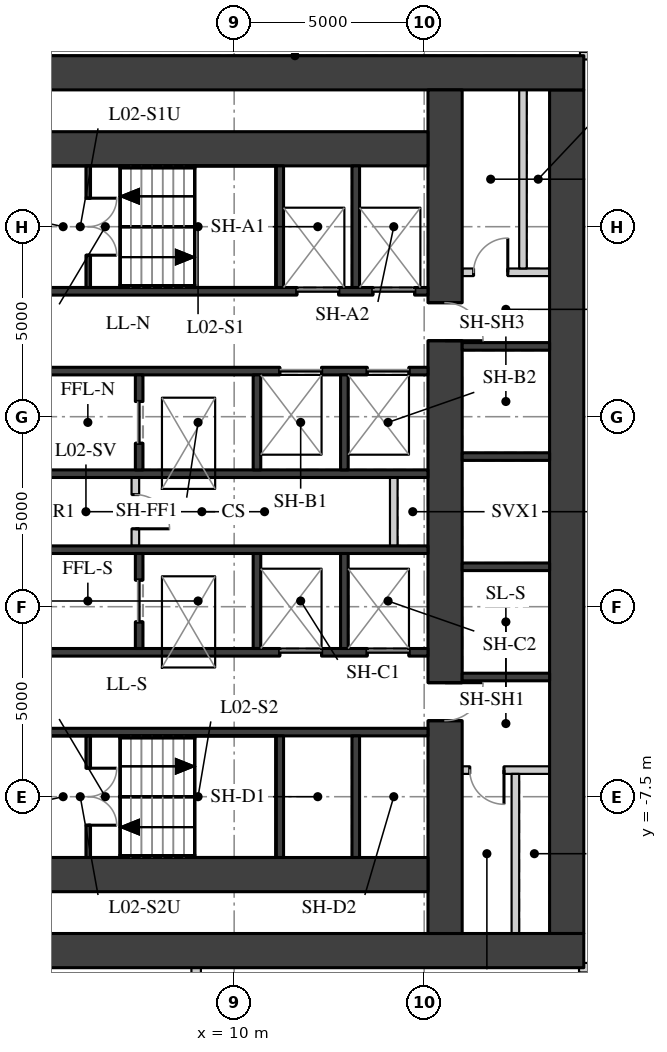
"""IFC4 building model, lengths in metres.
Left out: names, types, materials, properties, quantities, classifications, styles, units other than length and angle.
Written with IfcOpenShell. Run it as: python <this file> out.ifc"""

import sys

from ifc_helpers import new_model, si_unit, direction, frame, frame_2d, origin, place, context, subcontext, project, spatial, rectangle, extrude, element, fill, save


model = new_model("IFC4")
c1 = context("Model", 3, precision=1e-05, world=origin(), true_north=direction((0.0, 1.0)))
c2 = subcontext(c1, "Body", "Model", "MODEL_VIEW")
j1 = project(units=[si_unit("LENGTHUNIT", "METRE"), si_unit("PLANEANGLEUNIT", "RADIAN")], contexts=[c1])
p1 = place(None, origin())
s1 = spatial("IfcSite", under=j1, at=p1, CompositionType="ELEMENT")
p2 = place(p1, origin())
s2 = spatial("IfcBuilding", under=s1, at=p2, CompositionType="ELEMENT")
p3 = place(p2, frame((0.0, 0.0, 12.5)))
s3 = spatial("IfcBuildingStorey", under=s2, at=p3, CompositionType="ELEMENT", Elevation=12.5)
p4 = place(p3, frame((18.75, -11.1, 0.0), z_axis=(0.0, 0.0, 1.0), x_axis=(0.0, 1.0, 0.0)))
e1 = element("IfcWall", 1, at=p4, inside=s3, PredefinedType="SHEAR", context=c2, shape_type="SweptSolid", body=[
    extrude(rectangle(XDim=22.2, YDim=0.9, at=frame_2d((11.1, 0.0))), origin(), (0.0, 0.0, 1.0), 4.65),
])
for number, where, z_axis, x_axis in (
    (2, (4.0, 11.55, 0.0), (0.0, 0.0, 1.0), (1.0, 0.0, 0.0)),
    (3, (4.0, -11.55, 0.0), (0.0, 0.0, 1.0), (1.0, 0.0, 0.0)),
):
    element("IfcWall", number, at=place(p3, frame(where, z_axis=z_axis, x_axis=x_axis)), inside=s3, PredefinedType="SHEAR", context=c2, shape_type="SweptSolid", body=[
        extrude(rectangle(XDim=15.2, YDim=0.9, at=frame_2d((7.6, 0.0))), origin(), (0.0, 0.0, 1.0), 4.65),
    ])
p5 = place(p3, frame((15.55, -11.1, 0.0), z_axis=(0.0, 0.0, 1.0), x_axis=(0.0, 1.0, 0.0)))
e4 = element("IfcWall", 4, at=p5, inside=s3, PredefinedType="SHEAR", context=c2, shape_type="SweptSolid", body=[
    extrude(rectangle(XDim=22.2, YDim=0.9, at=frame_2d((11.1, 0.0))), origin(), (0.0, 0.0, 1.0), 4.65),
])
p6 = place(p5, frame((15.6, 0.0, 0.0)))
e5 = element("IfcOpeningElement", 5, at=p6, cuts=e4, PredefinedType="OPENING", context=c2, shape_type="SweptSolid", body=[
    extrude(rectangle(XDim=1.0, YDim=2.1, at=frame_2d((0.5, 1.05))), frame((0.0, 0.46, 0.0), z_axis=(0.0, -1.0, 0.0), x_axis=(1.0, 0.0, 0.0)), (0.0, 0.0, 1.0), 0.92),
])
p7 = place(p5, frame((5.6, 0.0, 0.0)))
e6 = element("IfcOpeningElement", 6, at=p7, cuts=e4, PredefinedType="OPENING", context=c2, shape_type="SweptSolid", body=[
    extrude(rectangle(XDim=1.0, YDim=2.1, at=frame_2d((0.5, 1.05))), frame((0.0, 0.46, 0.0), z_axis=(0.0, -1.0, 0.0), x_axis=(1.0, 0.0, 0.0)), (0.0, 0.0, 1.0), 0.92),
])
for number, where, z_axis, x_axis in (
    (7, (4.9, 9.55, 0.0), (0.0, 0.0, 1.0), (1.0, 0.0, 0.0)),
    (8, (4.9, -9.55, 0.0), (0.0, 0.0, 1.0), (1.0, 0.0, 0.0)),
):
    element("IfcWall", number, at=place(p3, frame(where, z_axis=z_axis, x_axis=x_axis)), inside=s3, PredefinedType="SHEAR", context=c2, shape_type="SweptSolid", body=[
        extrude(rectangle(XDim=10.2, YDim=0.9, at=frame_2d((5.1, 0.0))), origin(), (0.0, 0.0, 1.0), 4.65),
    ])
p8 = place(p3, frame((4.9, 5.8, 0.0), z_axis=(0.0, 0.0, 1.0), x_axis=(1.0, 0.0, 0.0)))
e9 = element("IfcWall", 9, at=p8, inside=s3, PredefinedType="SHEAR", context=c2, shape_type="SweptSolid", body=[
    extrude(rectangle(XDim=10.2, YDim=0.2, at=frame_2d((5.1, 0.0))), origin(), (0.0, 0.0, 1.0), 4.65),
])
p9 = place(p8, frame((6.75, 0.0, 0.0)))
e10 = element("IfcOpeningElement", 10, at=p9, cuts=e9, PredefinedType="OPENING", context=c2, shape_type="SweptSolid", body=[
    extrude(rectangle(XDim=1.1, YDim=2.1, at=frame_2d((0.55, 1.05))), frame((0.0, 0.11, 0.0), z_axis=(0.0, -1.0, 0.0), x_axis=(1.0, 0.0, 0.0)), (0.0, 0.0, 1.0), 0.22),
])
p10 = place(p8, frame((8.75, 0.0, 0.0)))
e11 = element("IfcOpeningElement", 11, at=p10, cuts=e9, PredefinedType="OPENING", context=c2, shape_type="SweptSolid", body=[
    extrude(rectangle(XDim=1.1, YDim=2.1, at=frame_2d((0.55, 1.05))), frame((0.0, 0.11, 0.0), z_axis=(0.0, -1.0, 0.0), x_axis=(1.0, 0.0, 0.0)), (0.0, 0.0, 1.0), 0.22),
])
p11 = place(p3, frame((4.9, 3.7, 0.0), z_axis=(0.0, 0.0, 1.0), x_axis=(1.0, 0.0, 0.0)))
e12 = element("IfcWall", 12, at=p11, inside=s3, PredefinedType="SHEAR", context=c2, shape_type="SweptSolid", body=[
    extrude(rectangle(XDim=10.2, YDim=0.2, at=frame_2d((5.1, 0.0))), origin(), (0.0, 0.0, 1.0), 4.65),
])
p12 = place(p11, frame((6.3, 0.0, 0.0)))
e13 = element("IfcOpeningElement", 13, at=p12, cuts=e12, PredefinedType="OPENING", context=c2, shape_type="SweptSolid", body=[
    extrude(rectangle(XDim=1.1, YDim=2.1, at=frame_2d((0.55, 1.05))), frame((0.0, 0.11, 0.0), z_axis=(0.0, -1.0, 0.0), x_axis=(1.0, 0.0, 0.0)), (0.0, 0.0, 1.0), 0.22),
])
p13 = place(p11, frame((8.6, 0.0, 0.0)))
e14 = element("IfcOpeningElement", 14, at=p13, cuts=e12, PredefinedType="OPENING", context=c2, shape_type="SweptSolid", body=[
    extrude(rectangle(XDim=1.1, YDim=2.1, at=frame_2d((0.55, 1.05))), frame((0.0, 0.11, 0.0), z_axis=(0.0, -1.0, 0.0), x_axis=(1.0, 0.0, 0.0)), (0.0, 0.0, 1.0), 0.22),
])
for number, where, z_axis, x_axis in (
    (15, (4.9, 1.0, 0.0), (0.0, 0.0, 1.0), (1.0, 0.0, 0.0)),
    (16, (4.9, -1.0, 0.0), (0.0, 0.0, 1.0), (1.0, 0.0, 0.0)),
):
    element("IfcWall", number, at=place(p3, frame(where, z_axis=z_axis, x_axis=x_axis)), inside=s3, PredefinedType="SHEAR", context=c2, shape_type="SweptSolid", body=[
        extrude(rectangle(XDim=10.2, YDim=0.2, at=frame_2d((5.1, 0.0))), origin(), (0.0, 0.0, 1.0), 4.65),
    ])
p14 = place(p3, frame((4.9, -3.7, 0.0), z_axis=(0.0, 0.0, 1.0), x_axis=(1.0, 0.0, 0.0)))
e17 = element("IfcWall", 17, at=p14, inside=s3, PredefinedType="SHEAR", context=c2, shape_type="SweptSolid", body=[
    extrude(rectangle(XDim=10.2, YDim=0.2, at=frame_2d((5.1, 0.0))), origin(), (0.0, 0.0, 1.0), 4.65),
])
p15 = place(p14, frame((6.3, 0.0, 0.0)))
e18 = element("IfcOpeningElement", 18, at=p15, cuts=e17, PredefinedType="OPENING", context=c2, shape_type="SweptSolid", body=[
    extrude(rectangle(XDim=1.1, YDim=2.1, at=frame_2d((0.55, 1.05))), frame((0.0, 0.11, 0.0), z_axis=(0.0, -1.0, 0.0), x_axis=(1.0, 0.0, 0.0)), (0.0, 0.0, 1.0), 0.22),
])
p16 = place(p14, frame((8.6, 0.0, 0.0)))
e19 = element("IfcOpeningElement", 19, at=p16, cuts=e17, PredefinedType="OPENING", context=c2, shape_type="SweptSolid", body=[
    extrude(rectangle(XDim=1.1, YDim=2.1, at=frame_2d((0.55, 1.05))), frame((0.0, 0.11, 0.0), z_axis=(0.0, -1.0, 0.0), x_axis=(1.0, 0.0, 0.0)), (0.0, 0.0, 1.0), 0.22),
])
p17 = place(p3, frame((4.9, -5.8, 0.0), z_axis=(0.0, 0.0, 1.0), x_axis=(1.0, 0.0, 0.0)))
e20 = element("IfcWall", 20, at=p17, inside=s3, PredefinedType="SHEAR", context=c2, shape_type="SweptSolid", body=[
    extrude(rectangle(XDim=10.2, YDim=0.2, at=frame_2d((5.1, 0.0))), origin(), (0.0, 0.0, 1.0), 4.65),
])
for number, where, z_axis, x_axis in (
    (21, (11.2, 5.9, 0.0), (0.0, 0.0, 1.0), (0.0, 1.0, 0.0)),
    (22, (11.2, -9.1, 0.0), (0.0, 0.0, 1.0), (0.0, 1.0, 0.0)),
    (23, (13.2, 5.9, 0.0), (0.0, 0.0, 1.0), (0.0, 1.0, 0.0)),
    (24, (13.2, -9.1, 0.0), (0.0, 0.0, 1.0), (0.0, 1.0, 0.0)),
):
    element("IfcWall", number, at=place(p3, frame(where, z_axis=z_axis, x_axis=x_axis)), inside=s3, PredefinedType="SHEAR", context=c2, shape_type="SweptSolid", body=[
        extrude(rectangle(XDim=3.2, YDim=0.2, at=frame_2d((1.6, 0.0))), origin(), (0.0, 0.0, 1.0), 4.65),
    ])
p18 = place(p3, frame((7.5, 1.1, 0.0), z_axis=(0.0, 0.0, 1.0), x_axis=(0.0, 1.0, 0.0)))
e25 = element("IfcWall", 25, at=p18, inside=s3, PredefinedType="SHEAR", context=c2, shape_type="SweptSolid", body=[
    extrude(rectangle(XDim=2.5, YDim=0.2, at=frame_2d((1.25, 0.0))), origin(), (0.0, 0.0, 1.0), 4.65),
])
p19 = place(p18, frame((0.7, 0.0, 0.0)))
e26 = element("IfcOpeningElement", 26, at=p19, cuts=e25, PredefinedType="OPENING", context=c2, shape_type="SweptSolid", body=[
    extrude(rectangle(XDim=1.1, YDim=2.1, at=frame_2d((0.55, 1.05))), frame((0.0, 0.11, 0.0), z_axis=(0.0, -1.0, 0.0), x_axis=(1.0, 0.0, 0.0)), (0.0, 0.0, 1.0), 0.22),
])
p20 = place(p3, frame((7.5, -3.6, 0.0), z_axis=(0.0, 0.0, 1.0), x_axis=(0.0, 1.0, 0.0)))
e27 = element("IfcWall", 27, at=p20, inside=s3, PredefinedType="SHEAR", context=c2, shape_type="SweptSolid", body=[
    extrude(rectangle(XDim=2.5, YDim=0.2, at=frame_2d((1.25, 0.0))), origin(), (0.0, 0.0, 1.0), 4.65),
])
p21 = place(p20, frame((0.7, 0.0, 0.0)))
e28 = element("IfcOpeningElement", 28, at=p21, cuts=e27, PredefinedType="OPENING", context=c2, shape_type="SweptSolid", body=[
    extrude(rectangle(XDim=1.1, YDim=2.1, at=frame_2d((0.55, 1.05))), frame((0.0, 0.11, 0.0), z_axis=(0.0, -1.0, 0.0), x_axis=(1.0, 0.0, 0.0)), (0.0, 0.0, 1.0), 0.22),
])
for number, where, z_axis, x_axis in (
    (29, (10.6, 1.1, 0.0), (0.0, 0.0, 1.0), (0.0, 1.0, 0.0)),
    (30, (10.6, -3.6, 0.0), (0.0, 0.0, 1.0), (0.0, 1.0, 0.0)),
    (31, (12.9, 1.1, 0.0), (0.0, 0.0, 1.0), (0.0, 1.0, 0.0)),
    (32, (12.9, -3.6, 0.0), (0.0, 0.0, 1.0), (0.0, 1.0, 0.0)),
):
    element("IfcWall", number, at=place(p3, frame(where, z_axis=z_axis, x_axis=x_axis)), inside=s3, PredefinedType="SHEAR", context=c2, shape_type="SweptSolid", body=[
        extrude(rectangle(XDim=2.5, YDim=0.2, at=frame_2d((1.25, 0.0))), origin(), (0.0, 0.0, 1.0), 4.65),
    ])
p22 = place(p3, frame((6.16, 5.9, 0.0), z_axis=(0.0, 0.0, 1.0), x_axis=(0.0, 1.0, 0.0)))
e33 = element("IfcWall", 33, at=p22, inside=s3, PredefinedType="SHEAR", context=c2, shape_type="SweptSolid", body=[
    extrude(rectangle(XDim=3.2, YDim=0.12, at=frame_2d((1.6, 0.0))), origin(), (0.0, 0.0, 1.0), 2.29),
])
p23 = place(p22, frame((0.85, 0.0, 0.0)))
e34 = element("IfcOpeningElement", 34, at=p23, cuts=e33, PredefinedType="OPENING", context=c2, shape_type="SweptSolid", body=[
    extrude(rectangle(XDim=1.5, YDim=2.1, at=frame_2d((0.75, 1.05))), frame((0.0, 0.07, 0.0), z_axis=(0.0, -1.0, 0.0), x_axis=(1.0, 0.0, 0.0)), (0.0, 0.0, 1.0), 0.14),
])
p24 = place(p3, frame((6.16, -9.1, 0.0), z_axis=(0.0, 0.0, 1.0), x_axis=(0.0, 1.0, 0.0)))
e35 = element("IfcWall", 35, at=p24, inside=s3, PredefinedType="SHEAR", context=c2, shape_type="SweptSolid", body=[
    extrude(rectangle(XDim=3.2, YDim=0.12, at=frame_2d((1.6, 0.0))), origin(), (0.0, 0.0, 1.0), 2.29),
])
p25 = place(p24, frame((0.85, 0.0, 0.0)))
e36 = element("IfcOpeningElement", 36, at=p25, cuts=e35, PredefinedType="OPENING", context=c2, shape_type="SweptSolid", body=[
    extrude(rectangle(XDim=1.5, YDim=2.1, at=frame_2d((0.75, 1.05))), frame((0.0, 0.07, 0.0), z_axis=(0.0, -1.0, 0.0), x_axis=(1.0, 0.0, 0.0)), (0.0, 0.0, 1.0), 0.14),
])
p26 = place(p3, frame((7.4, -0.9, 0.0), z_axis=(0.0, 0.0, 1.0), x_axis=(0.0, 1.0, 0.0)))
e37 = element("IfcWall", 37, at=p26, inside=s3, PredefinedType="PARTITIONING", context=c2, shape_type="SweptSolid", body=[
    extrude(rectangle(XDim=1.8, YDim=0.2, at=frame_2d((0.9, 0.0))), origin(), (0.0, 0.0, 1.0), 4.65),
])
p27 = place(p26, frame((0.45, 0.0, 0.0)))
e38 = element("IfcOpeningElement", 38, at=p27, cuts=e37, PredefinedType="OPENING", context=c2, shape_type="SweptSolid", body=[
    extrude(rectangle(XDim=0.9, YDim=2.1, at=frame_2d((0.45, 1.05))), frame((0.0, 0.11, 0.0), z_axis=(0.0, -1.0, 0.0), x_axis=(1.0, 0.0, 0.0)), (0.0, 0.0, 1.0), 0.22),
])
p28 = place(p3, frame((14.2, -0.9, 0.0), z_axis=(0.0, 0.0, 1.0), x_axis=(0.0, 1.0, 0.0)))
e39 = element("IfcWall", 39, at=p28, inside=s3, PredefinedType="PARTITIONING", context=c2, shape_type="SweptSolid", body=[
    extrude(rectangle(XDim=1.8, YDim=0.2, at=frame_2d((0.9, 0.0))), origin(), (0.0, 0.0, 1.0), 4.65),
])
for number, where, z_axis, x_axis in (
    (40, (16.0, -4.35, 0.0), (0.0, 0.0, 1.0), (1.0, 0.0, 0.0)),
    (41, (16.0, -1.45, 0.0), (0.0, 0.0, 1.0), (1.0, 0.0, 0.0)),
    (42, (16.0, 1.45, 0.0), (0.0, 0.0, 1.0), (1.0, 0.0, 0.0)),
    (43, (16.0, 4.35, 0.0), (0.0, 0.0, 1.0), (1.0, 0.0, 0.0)),
):
    element("IfcWall", number, at=place(p3, frame(where, z_axis=z_axis, x_axis=x_axis)), inside=s3, PredefinedType="SHEAR", context=c2, shape_type="SweptSolid", body=[
        extrude(rectangle(XDim=2.3, YDim=0.2, at=frame_2d((1.15, 0.0))), origin(), (0.0, 0.0, 1.0), 4.65),
    ])
p29 = place(p3, frame((16.0, 6.3, 0.0), z_axis=(0.0, 0.0, 1.0), x_axis=(1.0, 0.0, 0.0)))
e44 = element("IfcWall", 44, at=p29, inside=s3, PredefinedType="PARTITIONING", context=c2, shape_type="SweptSolid", body=[
    extrude(rectangle(XDim=2.3, YDim=0.2, at=frame_2d((1.15, 0.0))), origin(), (0.0, 0.0, 1.0), 4.65),
])
p30 = place(p29, frame((0.3, 0.0, 0.0)))
e45 = element("IfcOpeningElement", 45, at=p30, cuts=e44, PredefinedType="OPENING", context=c2, shape_type="SweptSolid", body=[
    extrude(rectangle(XDim=0.9, YDim=2.1, at=frame_2d((0.45, 1.05))), frame((0.0, 0.11, 0.0), z_axis=(0.0, -1.0, 0.0), x_axis=(1.0, 0.0, 0.0)), (0.0, 0.0, 1.0), 0.22),
])
p31 = place(p3, frame((17.6, 6.4, 0.0), z_axis=(0.0, 0.0, 1.0), x_axis=(0.0, 1.0, 0.0)))
e46 = element("IfcWall", 46, at=p31, inside=s3, PredefinedType="PARTITIONING", context=c2, shape_type="SweptSolid", body=[
    extrude(rectangle(XDim=4.7, YDim=0.2, at=frame_2d((2.35, 0.0))), origin(), (0.0, 0.0, 1.0), 4.65),
])
p32 = place(p3, frame((16.0, -6.8, 0.0), z_axis=(0.0, 0.0, 1.0), x_axis=(1.0, 0.0, 0.0)))
e47 = element("IfcWall", 47, at=p32, inside=s3, PredefinedType="PARTITIONING", context=c2, shape_type="SweptSolid", body=[
    extrude(rectangle(XDim=2.3, YDim=0.2, at=frame_2d((1.15, 0.0))), origin(), (0.0, 0.0, 1.0), 4.65),
])
p33 = place(p32, frame((0.2, 0.0, 0.0)))
e48 = element("IfcOpeningElement", 48, at=p33, cuts=e47, PredefinedType="OPENING", context=c2, shape_type="SweptSolid", body=[
    extrude(rectangle(XDim=0.9, YDim=2.1, at=frame_2d((0.45, 1.05))), frame((0.0, 0.11, 0.0), z_axis=(0.0, -1.0, 0.0), x_axis=(1.0, 0.0, 0.0)), (0.0, 0.0, 1.0), 0.22),
])
p34 = place(p3, frame((17.4, -11.1, 0.0), z_axis=(0.0, 0.0, 1.0), x_axis=(0.0, 1.0, 0.0)))
e49 = element("IfcWall", 49, at=p34, inside=s3, PredefinedType="PARTITIONING", context=c2, shape_type="SweptSolid", body=[
    extrude(rectangle(XDim=4.2, YDim=0.2, at=frame_2d((2.1, 0.0))), origin(), (0.0, 0.0, 1.0), 4.65),
])
p35 = place(p3, frame((19.075, -12.0, 0.0), z_axis=(0.0, 0.0, 1.0), x_axis=(1.0, 0.0, 0.0)))
e50 = element("IfcWall", 50, at=p35, inside=s3, PredefinedType="PARTITIONING", context=c2, shape_type="SweptSolid", body=[
    extrude(rectangle(XDim=21.806, YDim=0.25, at=frame_2d((10.903, 0.0))), origin(), (0.0, 0.0, 1.0), 3.75),
])
p36 = place(p35, frame((4.425, 0.0, 0.0)))
e51 = element("IfcOpeningElement", 51, at=p36, cuts=e50, PredefinedType="OPENING", context=c2, shape_type="SweptSolid", body=[
    extrude(rectangle(XDim=1.0, YDim=2.1, at=frame_2d((0.5, 1.05))), frame((0.0, 0.135, 0.0), z_axis=(0.0, -1.0, 0.0), x_axis=(1.0, 0.0, 0.0)), (0.0, 0.0, 1.0), 0.27),
])
p37 = place(p3, frame((19.1, 12.0, 0.0), z_axis=(0.0, 0.0, 1.0), x_axis=(1.0, 0.0, 0.0)))
e52 = element("IfcWall", 52, at=p37, inside=s3, PredefinedType="PARTITIONING", context=c2, shape_type="SweptSolid", body=[
    extrude(rectangle(XDim=21.767, YDim=0.2, at=frame_2d((10.883, 0.0))), origin(), (0.0, 0.0, 1.0), 3.65),
])
p38 = place(p37, frame((4.4, 0.0, 0.0)))
e53 = element("IfcOpeningElement", 53, at=p38, cuts=e52, PredefinedType="OPENING", context=c2, shape_type="SweptSolid", body=[
    extrude(rectangle(XDim=1.0, YDim=2.1, at=frame_2d((0.5, 1.05))), frame((0.0, 0.11, 0.0), z_axis=(0.0, -1.0, 0.0), x_axis=(1.0, 0.0, 0.0)), (0.0, 0.0, 1.0), 0.22),
])
p39 = place(p3, frame((9.0, -32.97, 0.0), z_axis=(0.0, 0.0, 1.0), x_axis=(0.0, 1.0, 0.0)))
e54 = element("IfcWall", 54, at=p39, inside=s3, PredefinedType="PARTITIONING", context=c2, shape_type="SweptSolid", body=[
    extrude(rectangle(XDim=20.972, YDim=0.25, at=frame_2d((10.486, 0.0))), origin(), (0.0, 0.0, 1.0), 4.1),
])
p40 = place(p39, frame((12.534, 0.0, 0.0)))
e55 = element("IfcOpeningElement", 55, at=p40, cuts=e54, PredefinedType="OPENING", context=c2, shape_type="SweptSolid", body=[
    extrude(rectangle(XDim=1.0, YDim=2.1, at=frame_2d((0.5, 1.05))), frame((0.0, 0.135, 0.0), z_axis=(0.0, -1.0, 0.0), x_axis=(1.0, 0.0, 0.0)), (0.0, 0.0, 1.0), 0.27),
])
p41 = place(p23, origin())
e56 = element("IfcDoor", 56, at=p41, inside=s3, OperationType="DOUBLE_DOOR_SINGLE_SWING", PredefinedType="DOOR", context=c2, shape_type="SweptSolid", body=[
    extrude(rectangle(XDim=1.5, YDim=2.1, at=frame_2d((0.75, 1.05))), frame((0.0, 0.025, 0.0), z_axis=(0.0, -1.0, 0.0), x_axis=(1.0, 0.0, 0.0)), (0.0, 0.0, 1.0), 0.05),
])
fill(e34, e56)
p42 = place(p25, origin())
e57 = element("IfcDoor", 57, at=p42, inside=s3, OperationType="DOUBLE_DOOR_SINGLE_SWING", PredefinedType="DOOR", context=c2, shape_type="SweptSolid", body=[
    extrude(rectangle(XDim=1.5, YDim=2.1, at=frame_2d((0.75, 1.05))), frame((0.0, 0.025, 0.0), z_axis=(0.0, -1.0, 0.0), x_axis=(1.0, 0.0, 0.0)), (0.0, 0.0, 1.0), 0.05),
])
fill(e36, e57)
p43 = place(p9, origin())
e58 = element("IfcDoor", 58, at=p43, inside=s3, OperationType="DOUBLE_DOOR_SLIDING", PredefinedType="DOOR", context=c2, shape_type="SweptSolid", body=[
    extrude(rectangle(XDim=1.1, YDim=2.1, at=frame_2d((0.55, 1.05))), frame((0.0, 0.025, 0.0), z_axis=(0.0, -1.0, 0.0), x_axis=(1.0, 0.0, 0.0)), (0.0, 0.0, 1.0), 0.05),
])
fill(e10, e58)
p44 = place(p10, origin())
e59 = element("IfcDoor", 59, at=p44, inside=s3, OperationType="DOUBLE_DOOR_SLIDING", PredefinedType="DOOR", context=c2, shape_type="SweptSolid", body=[
    extrude(rectangle(XDim=1.1, YDim=2.1, at=frame_2d((0.55, 1.05))), frame((0.0, 0.025, 0.0), z_axis=(0.0, -1.0, 0.0), x_axis=(1.0, 0.0, 0.0)), (0.0, 0.0, 1.0), 0.05),
])
fill(e11, e59)
p45 = place(p12, origin())
e60 = element("IfcDoor", 60, at=p45, inside=s3, OperationType="DOUBLE_DOOR_SLIDING", PredefinedType="DOOR", context=c2, shape_type="SweptSolid", body=[
    extrude(rectangle(XDim=1.1, YDim=2.1, at=frame_2d((0.55, 1.05))), frame((0.0, 0.025, 0.0), z_axis=(0.0, -1.0, 0.0), x_axis=(1.0, 0.0, 0.0)), (0.0, 0.0, 1.0), 0.05),
])
fill(e13, e60)
p46 = place(p13, origin())
e61 = element("IfcDoor", 61, at=p46, inside=s3, OperationType="DOUBLE_DOOR_SLIDING", PredefinedType="DOOR", context=c2, shape_type="SweptSolid", body=[
    extrude(rectangle(XDim=1.1, YDim=2.1, at=frame_2d((0.55, 1.05))), frame((0.0, 0.025, 0.0), z_axis=(0.0, -1.0, 0.0), x_axis=(1.0, 0.0, 0.0)), (0.0, 0.0, 1.0), 0.05),
])
fill(e14, e61)
p47 = place(p15, origin())
e62 = element("IfcDoor", 62, at=p47, inside=s3, OperationType="DOUBLE_DOOR_SLIDING", PredefinedType="DOOR", context=c2, shape_type="SweptSolid", body=[
    extrude(rectangle(XDim=1.1, YDim=2.1, at=frame_2d((0.55, 1.05))), frame((0.0, 0.025, 0.0), z_axis=(0.0, -1.0, 0.0), x_axis=(1.0, 0.0, 0.0)), (0.0, 0.0, 1.0), 0.05),
])
fill(e18, e62)
p48 = place(p16, origin())
e63 = element("IfcDoor", 63, at=p48, inside=s3, OperationType="DOUBLE_DOOR_SLIDING", PredefinedType="DOOR", context=c2, shape_type="SweptSolid", body=[
    extrude(rectangle(XDim=1.1, YDim=2.1, at=frame_2d((0.55, 1.05))), frame((0.0, 0.025, 0.0), z_axis=(0.0, -1.0, 0.0), x_axis=(1.0, 0.0, 0.0)), (0.0, 0.0, 1.0), 0.05),
])
fill(e19, e63)
p49 = place(p19, origin())
e64 = element("IfcDoor", 64, at=p49, inside=s3, OperationType="DOUBLE_DOOR_SLIDING", PredefinedType="DOOR", context=c2, shape_type="SweptSolid", body=[
    extrude(rectangle(XDim=1.1, YDim=2.1, at=frame_2d((0.55, 1.05))), frame((0.0, 0.025, 0.0), z_axis=(0.0, -1.0, 0.0), x_axis=(1.0, 0.0, 0.0)), (0.0, 0.0, 1.0), 0.05),
])
fill(e26, e64)
p50 = place(p21, origin())
e65 = element("IfcDoor", 65, at=p50, inside=s3, OperationType="DOUBLE_DOOR_SLIDING", PredefinedType="DOOR", context=c2, shape_type="SweptSolid", body=[
    extrude(rectangle(XDim=1.1, YDim=2.1, at=frame_2d((0.55, 1.05))), frame((0.0, 0.025, 0.0), z_axis=(0.0, -1.0, 0.0), x_axis=(1.0, 0.0, 0.0)), (0.0, 0.0, 1.0), 0.05),
])
fill(e28, e65)
p51 = place(p27, origin())
e66 = element("IfcDoor", 66, at=p51, inside=s3, OperationType="SINGLE_SWING_RIGHT", PredefinedType="DOOR", context=c2, shape_type="SweptSolid", body=[
    extrude(rectangle(XDim=0.9, YDim=2.1, at=frame_2d((0.45, 1.05))), frame((0.0, 0.025, 0.0), z_axis=(0.0, -1.0, 0.0), x_axis=(1.0, 0.0, 0.0)), (0.0, 0.0, 1.0), 0.05),
])
fill(e38, e66)
p52 = place(p6, origin())
e67 = element("IfcDoor", 67, at=p52, inside=s3, OperationType="SINGLE_SWING_RIGHT", PredefinedType="DOOR", context=c2, shape_type="SweptSolid", body=[
    extrude(rectangle(XDim=1.0, YDim=2.1, at=frame_2d((0.5, 1.05))), frame((0.0, 0.025, 0.0), z_axis=(0.0, -1.0, 0.0), x_axis=(1.0, 0.0, 0.0)), (0.0, 0.0, 1.0), 0.05),
])
fill(e5, e67)
p53 = place(p30, origin())
e68 = element("IfcDoor", 68, at=p53, inside=s3, OperationType="SINGLE_SWING_RIGHT", PredefinedType="DOOR", context=c2, shape_type="SweptSolid", body=[
    extrude(rectangle(XDim=0.9, YDim=2.1, at=frame_2d((0.45, 1.05))), frame((0.0, 0.025, 0.0), z_axis=(0.0, -1.0, 0.0), x_axis=(1.0, 0.0, 0.0)), (0.0, 0.0, 1.0), 0.05),
])
fill(e45, e68)
p54 = place(p7, origin())
e69 = element("IfcDoor", 69, at=p54, inside=s3, OperationType="SINGLE_SWING_LEFT", PredefinedType="DOOR", context=c2, shape_type="SweptSolid", body=[
    extrude(rectangle(XDim=1.0, YDim=2.1, at=frame_2d((0.5, 1.05))), frame((0.0, 0.025, 0.0), z_axis=(0.0, -1.0, 0.0), x_axis=(1.0, 0.0, 0.0)), (0.0, 0.0, 1.0), 0.05),
])
fill(e6, e69)
p55 = place(p33, origin())
e70 = element("IfcDoor", 70, at=p55, inside=s3, OperationType="SINGLE_SWING_LEFT", PredefinedType="DOOR", context=c2, shape_type="SweptSolid", body=[
    extrude(rectangle(XDim=0.9, YDim=2.1, at=frame_2d((0.45, 1.05))), frame((0.0, 0.025, 0.0), z_axis=(0.0, -1.0, 0.0), x_axis=(1.0, 0.0, 0.0)), (0.0, 0.0, 1.0), 0.05),
])
fill(e48, e70)
save(model, sys.argv[1])
